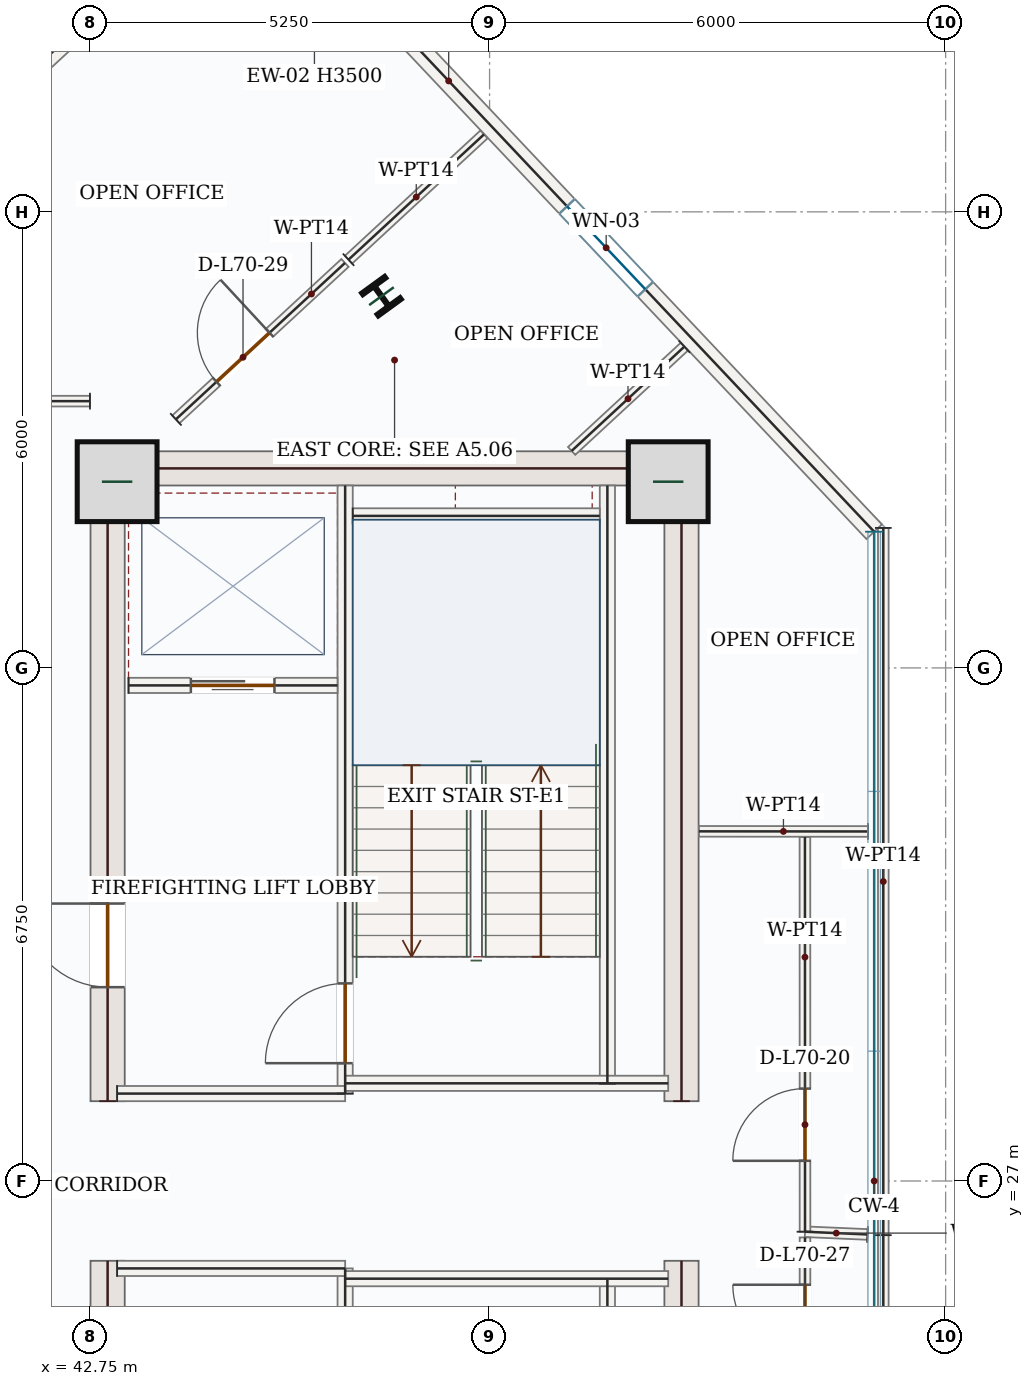
"""IFC4 building model, lengths in metres.
Left out: names, types, materials, properties, quantities, classifications, styles, units other than length and angle.
Written with IfcOpenShell. Run it as: python <this file> out.ifc"""

import sys

from ifc_helpers import new_model, si_unit, direction, frame, frame_2d, origin, origin_2d, place, context, subcontext, project, spatial, rectangle, i_section, extrude, source, transform, mapped, element, fill, save


model = new_model("IFC4")
c1 = context("Model", 3, precision=1e-05, world=origin(), true_north=direction((0.0, 1.0)))
c2 = subcontext(c1, "Body", "Model", "MODEL_VIEW")
j1 = project(units=[si_unit("LENGTHUNIT", "METRE"), si_unit("PLANEANGLEUNIT", "RADIAN")], contexts=[c1])
p1 = place(None, origin())
s1 = spatial("IfcSite", under=j1, at=p1, CompositionType="ELEMENT")
p2 = place(p1, origin())
s2 = spatial("IfcBuilding", under=s1, at=p2, CompositionType="ELEMENT")
p3 = place(p2, frame((0.0, 0.0, 291.6)))
s3 = spatial("IfcBuildingStorey", under=s2, at=p3, CompositionType="ELEMENT", Elevation=291.6)
p4 = place(p3, frame((42.975, 17.4, 0.0), z_axis=(0.0, 0.0, 1.0), x_axis=(0.0, 1.0, 0.0)))
e1 = element("IfcWall", 1, at=p4, inside=s3, PredefinedType="SHEAR", context=c2, shape_type="SweptSolid", body=[
    extrude(rectangle(XDim=8.55, YDim=0.45, at=frame_2d((4.275, 0.0))), origin(), (0.0, 0.0, 1.0), 3.5),
])
p5 = place(p4, frame((6.65, 0.0, 0.0)))
e2 = element("IfcOpeningElement", 2, at=p5, cuts=e1, PredefinedType="OPENING", context=c2, shape_type="SweptSolid", body=[
    extrude(rectangle(XDim=1.1, YDim=2.2, at=frame_2d((0.55, 1.1))), frame((0.0, 0.235, 0.0), z_axis=(0.0, -1.0, 0.0), x_axis=(1.0, 0.0, 0.0)), (0.0, 0.0, 1.0), 0.47),
])
p6 = place(p4, frame((1.75, 0.0, 0.0)))
e3 = element("IfcOpeningElement", 3, at=p6, cuts=e1, PredefinedType="OPENING", context=c2, shape_type="SweptSolid", body=[
    extrude(rectangle(XDim=1.3, YDim=2.2, at=frame_2d((0.65, 1.1))), frame((0.0, 0.235, 0.0), z_axis=(0.0, -1.0, 0.0), x_axis=(1.0, 0.0, 0.0)), (0.0, 0.0, 1.0), 0.47),
])
p7 = place(p4, frame((4.55, 0.0, 0.0)))
e4 = element("IfcOpeningElement", 4, at=p7, cuts=e1, PredefinedType="OPENING", context=c2, shape_type="SweptSolid", body=[
    extrude(rectangle(XDim=0.88, YDim=2.1, at=frame_2d((0.44, 1.05))), frame((0.0, 0.235, 0.0), z_axis=(0.0, -1.0, 0.0), x_axis=(1.0, 0.0, 0.0)), (0.0, 0.0, 1.0), 0.47),
])
p8 = place(p3, frame((42.975, 28.05, 0.0), z_axis=(0.0, 0.0, 1.0), x_axis=(0.0, 1.0, 0.0)))
e5 = element("IfcWall", 5, at=p8, inside=s3, PredefinedType="SHEAR", context=c2, shape_type="SweptSolid", body=[
    extrude(rectangle(XDim=8.55, YDim=0.45, at=frame_2d((4.275, 0.0))), origin(), (0.0, 0.0, 1.0), 3.5),
])
p9 = place(p8, frame((1.5, 0.0, 0.0)))
e6 = element("IfcOpeningElement", 6, at=p9, cuts=e5, PredefinedType="OPENING", context=c2, shape_type="SweptSolid", body=[
    extrude(rectangle(XDim=1.1, YDim=2.2, at=frame_2d((0.55, 1.1))), frame((0.0, 0.235, 0.0), z_axis=(0.0, -1.0, 0.0), x_axis=(1.0, 0.0, 0.0)), (0.0, 0.0, 1.0), 0.47),
])
m1 = source(origin(), c2, "Body", "SweptSolid", [
    extrude(rectangle(XDim=8.55, YDim=0.45, at=frame_2d((4.275, 0.0))), origin(), (0.0, 0.0, 1.0), 3.5),
])
for number, where, z_axis, x_axis in (
    (7, (50.525, 17.4, 0.0), (0.0, 0.0, 1.0), (0.0, 1.0, 0.0)),
    (8, (50.525, 28.05, 0.0), (0.0, 0.0, 1.0), (0.0, 1.0, 0.0)),
):
    element("IfcWall", number, at=place(p3, frame(where, z_axis=z_axis, x_axis=x_axis)), inside=s3, PredefinedType="SHEAR", context=c2, shape_type="MappedRepresentation", body=[
        mapped(m1, transform((0.0, 0.0, 0.0), x_axis=(1.0, 0.0, 0.0), y_axis=(0.0, 1.0, 0.0), z_axis=(0.0, 0.0, 1.0), scale=1.0)),
    ])
m2 = source(origin(), c2, "Body", "SweptSolid", [
    extrude(rectangle(XDim=7.1, YDim=0.45, at=frame_2d((3.55, 0.0))), origin(), (0.0, 0.0, 1.0), 3.5),
])
p10 = place(p3, frame((43.2, 36.375, 0.0), z_axis=(0.0, 0.0, 1.0), x_axis=(1.0, 0.0, 0.0)))
e9 = element("IfcWall", 9, at=p10, inside=s3, PredefinedType="SHEAR", context=c2, shape_type="MappedRepresentation", body=[
    mapped(m2, transform((0.0, 0.0, 0.0), x_axis=(1.0, 0.0, 0.0), y_axis=(0.0, 1.0, 0.0), z_axis=(0.0, 0.0, 1.0), scale=1.0)),
])
m3 = source(origin(), c2, "Body", "SweptSolid", [
    extrude(rectangle(XDim=1.05, YDim=1.05, at=origin_2d()), origin(), (0.0, 0.0, 1.0), 3.75),
])
for number, where, z_axis, x_axis in (
    (10, (43.1, 36.2, 0.0), (0.0, 0.0, 1.0), (1.0, 0.0, 0.0)),
    (11, (50.35, 36.2, 0.0), (0.0, 0.0, 1.0), (1.0, 0.0, 0.0)),
):
    element("IfcColumn", number, at=place(p3, frame(where, z_axis=z_axis, x_axis=x_axis)), inside=s3, PredefinedType="COLUMN", context=c2, shape_type="MappedRepresentation", body=[
        mapped(m3, transform((0.0, 0.0, 0.0), x_axis=(1.0, 0.0, 0.0), y_axis=(0.0, 1.0, 0.0), z_axis=(0.0, 0.0, 1.0), scale=1.0)),
    ])
m4 = source(origin(), c2, "Body", "SweptSolid", [
    extrude(i_section(OverallWidth=0.374, OverallDepth=0.372, WebThickness=0.016, FlangeThickness=0.026, FilletRadius=0.018, at=origin_2d()), origin(), (0.0, 0.0, 1.0), 3.75),
])
p11 = place(p3, frame((46.578, 38.641, 0.0), z_axis=(0.0, 0.0, 1.0), x_axis=(0.809016994375, 0.587785252292, 0.0)))
e12 = element("IfcColumn", 12, at=p11, inside=s3, PredefinedType="COLUMN", context=c2, shape_type="MappedRepresentation", body=[
    mapped(m4, transform((0.0, 0.0, 0.0), x_axis=(1.0, 0.0, 0.0), y_axis=(0.0, 1.0, 0.0), z_axis=(0.0, 0.0, 1.0), scale=1.0)),
])
p12 = place(p3, frame((39.447, 39.26, 0.0), z_axis=(0.0, 0.0, 1.0), x_axis=(0.734109106874, 0.679031530346, 0.0)))
e13 = element("IfcWall", 13, at=p12, inside=s3, PredefinedType="SOLIDWALL", context=c2, shape_type="SweptSolid", body=[
    extrude(rectangle(XDim=5.665, YDim=0.28, at=frame_2d((2.833, 0.0))), origin(), (0.0, 0.0, 1.0), 3.5),
])
p13 = place(p12, frame((2.082, 0.0, 0.85)))
e14 = element("IfcOpeningElement", 14, at=p13, cuts=e13, PredefinedType="OPENING", context=c2, shape_type="SweptSolid", body=[
    extrude(rectangle(XDim=1.5, YDim=1.5, at=frame_2d((0.75, 0.75))), frame((0.0, 0.15, 0.0), z_axis=(0.0, -1.0, 0.0), x_axis=(1.0, 0.0, 0.0)), (0.0, 0.0, 1.0), 0.3),
])
p14 = place(p3, frame((46.008, 43.013, 0.0), z_axis=(0.0, 0.0, 1.0), x_axis=(0.68643580465, -0.727190405667, 0.0)))
e15 = element("IfcWall", 15, at=p14, inside=s3, PredefinedType="SOLIDWALL", context=c2, shape_type="SweptSolid", body=[
    extrude(rectangle(XDim=10.274, YDim=0.28, at=frame_2d((5.137, 0.0))), origin(), (0.0, 0.0, 1.0), 3.5),
])
p15 = place(p14, frame((4.387, 0.0, 0.85)))
e16 = element("IfcOpeningElement", 16, at=p15, cuts=e15, PredefinedType="OPENING", context=c2, shape_type="SweptSolid", body=[
    extrude(rectangle(XDim=1.5, YDim=1.5, at=frame_2d((0.75, 0.75))), frame((0.0, 0.15, 0.0), z_axis=(0.0, -1.0, 0.0), x_axis=(1.0, 0.0, 0.0)), (0.0, 0.0, 1.0), 0.3),
])
m5 = source(origin(), c2, "Body", "SweptSolid", [
    extrude(rectangle(XDim=7.87, YDim=0.2, at=frame_2d((3.935, 0.0))), origin(), (0.0, 0.0, 1.0), 3.5),
])
for number, where, z_axis, x_axis in (
    (17, (49.55, 17.85, 0.0), (0.0, 0.0, 1.0), (0.0, 1.0, 0.0)),
    (18, (49.55, 28.28, 0.0), (0.0, 0.0, 1.0), (0.0, 1.0, 0.0)),
):
    element("IfcWall", number, at=place(p3, frame(where, z_axis=z_axis, x_axis=x_axis)), inside=s3, PredefinedType="SOLIDWALL", context=c2, shape_type="MappedRepresentation", body=[
        mapped(m5, transform((0.0, 0.0, 0.0), x_axis=(1.0, 0.0, 0.0), y_axis=(0.0, 1.0, 0.0), z_axis=(0.0, 0.0, 1.0), scale=1.0)),
    ])
p16 = place(p3, frame((46.1, 17.85, 0.0), z_axis=(0.0, 0.0, 1.0), x_axis=(0.0, 1.0, 0.0)))
e19 = element("IfcWall", 19, at=p16, inside=s3, PredefinedType="SOLIDWALL", context=c2, shape_type="SweptSolid", body=[
    extrude(rectangle(XDim=8.0, YDim=0.2, at=frame_2d((4.0, 0.0))), origin(), (0.0, 0.0, 1.0), 3.5),
])
p17 = place(p16, frame((6.3, 0.0, 0.0)))
e20 = element("IfcOpeningElement", 20, at=p17, cuts=e19, PredefinedType="OPENING", context=c2, shape_type="SweptSolid", body=[
    extrude(rectangle(XDim=1.05, YDim=2.15, at=frame_2d((0.525, 1.075))), frame((0.0, 0.11, 0.0), z_axis=(0.0, -1.0, 0.0), x_axis=(1.0, 0.0, 0.0)), (0.0, 0.0, 1.0), 0.22),
])
p18 = place(p3, frame((46.1, 28.15, 0.0), z_axis=(0.0, 0.0, 1.0), x_axis=(0.0, 1.0, 0.0)))
e21 = element("IfcWall", 21, at=p18, inside=s3, PredefinedType="SOLIDWALL", context=c2, shape_type="SweptSolid", body=[
    extrude(rectangle(XDim=8.0, YDim=0.2, at=frame_2d((4.0, 0.0))), origin(), (0.0, 0.0, 1.0), 3.5),
])
p19 = place(p18, frame((0.4, 0.0, 0.0)))
e22 = element("IfcOpeningElement", 22, at=p19, cuts=e21, PredefinedType="OPENING", context=c2, shape_type="SweptSolid", body=[
    extrude(rectangle(XDim=1.05, YDim=2.15, at=frame_2d((0.525, 1.075))), frame((0.0, 0.11, 0.0), z_axis=(0.0, -1.0, 0.0), x_axis=(1.0, 0.0, 0.0)), (0.0, 0.0, 1.0), 0.22),
])
m6 = source(origin(), c2, "Body", "SweptSolid", [
    extrude(rectangle(XDim=3.0, YDim=0.2, at=frame_2d((1.5, 0.0))), origin(), (0.0, 0.0, 1.0), 3.5),
])
p20 = place(p3, frame((43.1, 25.85, 0.0), z_axis=(0.0, 0.0, 1.0), x_axis=(1.0, 0.0, 0.0)))
e23 = element("IfcWall", 23, at=p20, inside=s3, PredefinedType="SOLIDWALL", context=c2, shape_type="MappedRepresentation", body=[
    mapped(m6, transform((0.0, 0.0, 0.0), x_axis=(1.0, 0.0, 0.0), y_axis=(0.0, 1.0, 0.0), z_axis=(0.0, 0.0, 1.0), scale=1.0)),
])
m7 = source(origin(), c2, "Body", "SweptSolid", [
    extrude(rectangle(XDim=4.25, YDim=0.2, at=frame_2d((2.125, 0.0))), origin(), (0.0, 0.0, 1.0), 3.5),
])
p21 = place(p3, frame((46.1, 25.715, 0.0), z_axis=(0.0, 0.0, 1.0), x_axis=(1.0, 0.0, 0.0)))
e24 = element("IfcWall", 24, at=p21, inside=s3, PredefinedType="SOLIDWALL", context=c2, shape_type="MappedRepresentation", body=[
    mapped(m7, transform((0.0, 0.0, 0.0), x_axis=(1.0, 0.0, 0.0), y_axis=(0.0, 1.0, 0.0), z_axis=(0.0, 0.0, 1.0), scale=1.0)),
])
p22 = place(p3, frame((43.1, 28.15, 0.0), z_axis=(0.0, 0.0, 1.0), x_axis=(1.0, 0.0, 0.0)))
e25 = element("IfcWall", 25, at=p22, inside=s3, PredefinedType="SOLIDWALL", context=c2, shape_type="MappedRepresentation", body=[
    mapped(m6, transform((0.0, 0.0, 0.0), x_axis=(1.0, 0.0, 0.0), y_axis=(0.0, 1.0, 0.0), z_axis=(0.0, 0.0, 1.0), scale=1.0)),
])
p23 = place(p3, frame((46.1, 28.285, 0.0), z_axis=(0.0, 0.0, 1.0), x_axis=(1.0, 0.0, 0.0)))
e26 = element("IfcWall", 26, at=p23, inside=s3, PredefinedType="SOLIDWALL", context=c2, shape_type="MappedRepresentation", body=[
    mapped(m7, transform((0.0, 0.0, 0.0), x_axis=(1.0, 0.0, 0.0), y_axis=(0.0, 1.0, 0.0), z_axis=(0.0, 0.0, 1.0), scale=1.0)),
])
m8 = source(origin(), c2, "Body", "SweptSolid", [
    extrude(rectangle(XDim=3.25, YDim=0.2, at=frame_2d((1.625, 0.0))), origin(), (0.0, 0.0, 1.0), 3.5),
])
p24 = place(p3, frame((46.2, 35.75, 0.0), z_axis=(0.0, 0.0, 1.0), x_axis=(1.0, 0.0, 0.0)))
e27 = element("IfcWall", 27, at=p24, inside=s3, PredefinedType="SOLIDWALL", context=c2, shape_type="MappedRepresentation", body=[
    mapped(m8, transform((0.0, 0.0, 0.0), x_axis=(1.0, 0.0, 0.0), y_axis=(0.0, 1.0, 0.0), z_axis=(0.0, 0.0, 1.0), scale=1.0)),
])
p25 = place(p3, frame((43.25, 33.52, 0.0), z_axis=(0.0, 0.0, 1.0), x_axis=(1.0, 0.0, 0.0)))
e28 = element("IfcWall", 28, at=p25, inside=s3, PredefinedType="SOLIDWALL", context=c2, shape_type="SweptSolid", body=[
    extrude(rectangle(XDim=2.75, YDim=0.2, at=frame_2d((1.375, 0.0))), origin(), (0.0, 0.0, 1.0), 3.5),
])
p26 = place(p25, frame((0.82, 0.0, 0.0)))
e29 = element("IfcOpeningElement", 29, at=p26, cuts=e28, PredefinedType="OPENING", context=c2, shape_type="SweptSolid", body=[
    extrude(rectangle(XDim=1.1, YDim=2.15, at=frame_2d((0.55, 1.075))), frame((0.0, 0.11, 0.0), z_axis=(0.0, -1.0, 0.0), x_axis=(1.0, 0.0, 0.0)), (0.0, 0.0, 1.0), 0.22),
])
p27 = place(p3, frame((43.873, 37.02, 0.0), z_axis=(0.0, 0.0, 1.0), x_axis=(0.734120521476, 0.679019189676, 0.0)))
e30 = element("IfcWall", 30, at=p27, inside=s3, PredefinedType="PARTITIONING", context=c2, shape_type="SweptSolid", body=[
    extrude(rectangle(XDim=3.031, YDim=0.14, at=frame_2d((1.515, 0.0))), origin(), (0.0, 0.0, 1.0), 3.5),
])
p28 = place(p27, frame((0.728, 0.0, 0.0)))
e31 = element("IfcOpeningElement", 31, at=p28, cuts=e30, PredefinedType="OPENING", context=c2, shape_type="SweptSolid", body=[
    extrude(rectangle(XDim=0.95, YDim=2.15, at=frame_2d((0.475, 1.075))), frame((0.0, 0.08, 0.0), z_axis=(0.0, -1.0, 0.0), x_axis=(1.0, 0.0, 0.0)), (0.0, 0.0, 1.0), 0.16),
])
m9 = source(origin(), c2, "Body", "SweptSolid", [
    extrude(rectangle(XDim=2.428, YDim=0.14, at=frame_2d((1.214, 0.0))), origin(), (0.0, 0.0, 1.0), 3.5),
])
p29 = place(p3, frame((46.144, 39.121, 0.0), z_axis=(0.0, 0.0, 1.0), x_axis=(0.734124504125, 0.679014883815, 0.0)))
e32 = element("IfcWall", 32, at=p29, inside=s3, PredefinedType="PARTITIONING", context=c2, shape_type="MappedRepresentation", body=[
    mapped(m9, transform((0.0, 0.0, 0.0), x_axis=(1.0, 0.0, 0.0), y_axis=(0.0, 1.0, 0.0), z_axis=(0.0, 0.0, 1.0), scale=1.0)),
])
m10 = source(origin(), c2, "Body", "SweptSolid", [
    extrude(rectangle(XDim=2.02, YDim=0.14, at=frame_2d((1.01, 0.0))), origin(), (0.0, 0.0, 1.0), 3.5),
])
p30 = place(p3, frame((50.562, 37.977, 0.0), z_axis=(0.0, 0.0, 1.0), x_axis=(-0.734126550915, -0.679012670899, 0.0)))
e33 = element("IfcWall", 33, at=p30, inside=s3, PredefinedType="PARTITIONING", context=c2, shape_type="MappedRepresentation", body=[
    mapped(m10, transform((0.0, 0.0, 0.0), x_axis=(1.0, 0.0, 0.0), y_axis=(0.0, 1.0, 0.0), z_axis=(0.0, 0.0, 1.0), scale=1.0)),
])
m11 = source(origin(), c2, "Body", "SweptSolid", [
    extrude(rectangle(XDim=2.223, YDim=0.14, at=frame_2d((1.111, 0.0))), origin(), (0.0, 0.0, 1.0), 3.5),
])
p31 = place(p3, frame((52.978, 31.598, 0.0), z_axis=(0.0, 0.0, 1.0), x_axis=(-0.999999704402, 0.000768892567, 0.0)))
e34 = element("IfcWall", 34, at=p31, inside=s3, PredefinedType="PARTITIONING", context=c2, shape_type="MappedRepresentation", body=[
    mapped(m11, transform((0.0, 0.0, 0.0), x_axis=(1.0, 0.0, 0.0), y_axis=(0.0, 1.0, 0.0), z_axis=(0.0, 0.0, 1.0), scale=1.0)),
])
m12 = source(origin(), c2, "Body", "SweptSolid", [
    extrude(rectangle(XDim=9.304, YDim=0.14, at=frame_2d((4.652, 0.0))), origin(), (0.0, 0.0, 1.0), 3.5),
])
p32 = place(p3, frame((53.18, 35.592, 0.0), z_axis=(0.0, 0.0, 1.0), x_axis=(0.0, -1.0, 0.0)))
e35 = element("IfcWall", 35, at=p32, inside=s3, PredefinedType="PARTITIONING", context=c2, shape_type="MappedRepresentation", body=[
    mapped(m12, transform((0.0, 0.0, 0.0), x_axis=(1.0, 0.0, 0.0), y_axis=(0.0, 1.0, 0.0), z_axis=(0.0, 0.0, 1.0), scale=1.0)),
])
m13 = source(origin(), c2, "Body", "SweptSolid", [
    extrude(rectangle(XDim=0.823, YDim=0.14, at=frame_2d((0.412, 0.0))), origin(), (0.0, 0.0, 1.0), 3.5),
])
p33 = place(p3, frame((52.972, 26.297, 0.0), z_axis=(0.0, 0.0, 1.0), x_axis=(-0.999049432265, 0.043591649315, 0.0)))
e36 = element("IfcWall", 36, at=p33, inside=s3, PredefinedType="PARTITIONING", context=c2, shape_type="MappedRepresentation", body=[
    mapped(m13, transform((0.0, 0.0, 0.0), x_axis=(1.0, 0.0, 0.0), y_axis=(0.0, 1.0, 0.0), z_axis=(0.0, 0.0, 1.0), scale=1.0)),
])
p34 = place(p3, frame((52.15, 26.333, 0.0), z_axis=(0.0, 0.0, 1.0), x_axis=(-0.000188111359, 0.999999982307, 0.0)))
e37 = element("IfcWall", 37, at=p34, inside=s3, PredefinedType="PARTITIONING", context=c2, shape_type="SweptSolid", body=[
    extrude(rectangle(XDim=5.191, YDim=0.14, at=frame_2d((2.596, 0.0))), origin(), (0.0, 0.0, 1.0), 3.5),
])
p35 = place(p34, frame((0.933, 0.0, 0.0)))
e38 = element("IfcOpeningElement", 38, at=p35, cuts=e37, PredefinedType="OPENING", context=c2, shape_type="SweptSolid", body=[
    extrude(rectangle(XDim=0.95, YDim=2.15, at=frame_2d((0.475, 1.075))), frame((0.0, 0.08, 0.0), z_axis=(0.0, -1.0, 0.0), x_axis=(1.0, 0.0, 0.0)), (0.0, 0.0, 1.0), 0.16),
])
p36 = place(p3, frame((52.149, 22.477, 0.0), z_axis=(0.0, 0.0, 1.0), x_axis=(0.000322913959, 0.999999947863, 0.0)))
e39 = element("IfcWall", 39, at=p36, inside=s3, PredefinedType="PARTITIONING", context=c2, shape_type="SweptSolid", body=[
    extrude(rectangle(XDim=3.78, YDim=0.14, at=frame_2d((1.89, 0.0))), origin(), (0.0, 0.0, 1.0), 3.5),
])
p37 = place(p36, frame((2.208, 0.0, 0.0)))
e40 = element("IfcOpeningElement", 40, at=p37, cuts=e39, PredefinedType="OPENING", context=c2, shape_type="SweptSolid", body=[
    extrude(rectangle(XDim=0.95, YDim=2.15, at=frame_2d((0.475, 1.075))), frame((0.0, 0.08, 0.0), z_axis=(0.0, -1.0, 0.0), x_axis=(1.0, 0.0, 0.0)), (0.0, 0.0, 1.0), 0.16),
])
m14 = source(origin(), c2, "Body", "SweptSolid", [
    extrude(rectangle(XDim=7.879, YDim=0.14, at=frame_2d((3.94, 0.0))), origin(), (0.0, 0.0, 1.0), 3.5),
])
p38 = place(p3, frame((53.18, 26.288, 0.0), z_axis=(0.0, 0.0, 1.0), x_axis=(0.0, -1.0, 0.0)))
e41 = element("IfcWall", 41, at=p38, inside=s3, PredefinedType="PARTITIONING", context=c2, shape_type="MappedRepresentation", body=[
    mapped(m14, transform((0.0, 0.0, 0.0), x_axis=(1.0, 0.0, 0.0), y_axis=(0.0, 1.0, 0.0), z_axis=(0.0, 0.0, 1.0), scale=1.0)),
])
p39 = place(p3, frame((42.742, 37.26, 0.0), z_axis=(0.0, 0.0, 1.0), x_axis=(-0.999999999261, 3.8433452e-05, 0.0)))
e42 = element("IfcWall", 42, at=p39, inside=s3, PredefinedType="PARTITIONING", context=c2, shape_type="SweptSolid", body=[
    extrude(rectangle(XDim=6.352, YDim=0.14, at=frame_2d((3.176, 0.0))), origin(), (0.0, 0.0, 1.0), 3.5),
])
p40 = place(p39, frame((4.214, 0.0, 0.0)))
e43 = element("IfcOpeningElement", 43, at=p40, cuts=e42, PredefinedType="OPENING", context=c2, shape_type="SweptSolid", body=[
    extrude(rectangle(XDim=0.95, YDim=2.15, at=frame_2d((0.475, 1.075))), frame((0.0, 0.08, 0.0), z_axis=(0.0, -1.0, 0.0), x_axis=(1.0, 0.0, 0.0)), (0.0, 0.0, 1.0), 0.16),
])
m15 = source(origin(), c2, "Body", "SweptSolid", [
    extrude(rectangle(XDim=1.5, YDim=1.5, at=frame_2d((0.75, 0.75))), frame((0.0, 0.03, 0.0), z_axis=(0.0, -1.0, 0.0), x_axis=(1.0, 0.0, 0.0)), (0.0, 0.0, 1.0), 0.06),
])
p41 = place(p15, origin())
e44 = element("IfcWindow", 44, at=p41, inside=s3, PartitioningType="SINGLE_PANEL", PredefinedType="WINDOW", context=c2, shape_type="MappedRepresentation", body=[
    mapped(m15, transform((0.0, 0.0, 0.0), x_axis=(1.0, 0.0, 0.0), y_axis=(0.0, 1.0, 0.0), z_axis=(0.0, 0.0, 1.0), scale=1.0)),
])
fill(e16, e44)
m16 = source(origin(), c2, "Body", "SweptSolid", [
    extrude(rectangle(XDim=1.05, YDim=2.15, at=frame_2d((0.525, 1.075))), frame((0.0, 0.025, 0.0), z_axis=(0.0, -1.0, 0.0), x_axis=(1.0, 0.0, 0.0)), (0.0, 0.0, 1.0), 0.05),
])
p42 = place(p19, origin())
e45 = element("IfcDoor", 45, at=p42, inside=s3, OperationType="SINGLE_SWING_LEFT", PredefinedType="DOOR", context=c2, shape_type="MappedRepresentation", body=[
    mapped(m16, transform((0.0, 0.0, 0.0), x_axis=(1.0, 0.0, 0.0), y_axis=(0.0, 1.0, 0.0), z_axis=(0.0, 0.0, 1.0), scale=1.0)),
])
fill(e22, e45)
m17 = source(origin(), c2, "Body", "SweptSolid", [
    extrude(rectangle(XDim=1.1, YDim=2.15, at=frame_2d((0.55, 1.075))), frame((0.0, 0.025, 0.0), z_axis=(0.0, -1.0, 0.0), x_axis=(1.0, 0.0, 0.0)), (0.0, 0.0, 1.0), 0.05),
])
p43 = place(p26, origin())
e46 = element("IfcDoor", 46, at=p43, inside=s3, OperationType="DOUBLE_DOOR_SLIDING", PredefinedType="DOOR", context=c2, shape_type="MappedRepresentation", body=[
    mapped(m17, transform((0.0, 0.0, 0.0), x_axis=(1.0, 0.0, 0.0), y_axis=(0.0, 1.0, 0.0), z_axis=(0.0, 0.0, 1.0), scale=1.0)),
])
fill(e29, e46)
m18 = source(origin(), c2, "Body", "SweptSolid", [
    extrude(rectangle(XDim=1.1, YDim=2.2, at=frame_2d((0.55, 1.1))), frame((0.0, 0.025, 0.0), z_axis=(0.0, -1.0, 0.0), x_axis=(1.0, 0.0, 0.0)), (0.0, 0.0, 1.0), 0.05),
])
p44 = place(p9, origin())
e47 = element("IfcDoor", 47, at=p44, inside=s3, OperationType="SINGLE_SWING_RIGHT", PredefinedType="DOOR", context=c2, shape_type="MappedRepresentation", body=[
    mapped(m18, transform((0.0, 0.0, 0.0), x_axis=(1.0, 0.0, 0.0), y_axis=(0.0, 1.0, 0.0), z_axis=(0.0, 0.0, 1.0), scale=1.0)),
])
fill(e6, e47)
m19 = source(origin(), c2, "Body", "SweptSolid", [
    extrude(rectangle(XDim=0.95, YDim=2.15, at=frame_2d((0.475, 1.075))), frame((0.0, 0.025, 0.0), z_axis=(0.0, -1.0, 0.0), x_axis=(1.0, 0.0, 0.0)), (0.0, 0.0, 1.0), 0.05),
])
p45 = place(p35, origin())
e48 = element("IfcDoor", 48, at=p45, inside=s3, OperationType="SINGLE_SWING_LEFT", PredefinedType="DOOR", context=c2, shape_type="MappedRepresentation", body=[
    mapped(m19, transform((0.0, 0.0, 0.0), x_axis=(1.0, 0.0, 0.0), y_axis=(0.0, 1.0, 0.0), z_axis=(0.0, 0.0, 1.0), scale=1.0)),
])
fill(e38, e48)
p46 = place(p37, origin())
e49 = element("IfcDoor", 49, at=p46, inside=s3, OperationType="SINGLE_SWING_RIGHT", PredefinedType="DOOR", context=c2, shape_type="MappedRepresentation", body=[
    mapped(m19, transform((0.0, 0.0, 0.0), x_axis=(1.0, 0.0, 0.0), y_axis=(0.0, 1.0, 0.0), z_axis=(0.0, 0.0, 1.0), scale=1.0)),
])
fill(e40, e49)
p47 = place(p28, origin())
e50 = element("IfcDoor", 50, at=p47, inside=s3, OperationType="SINGLE_SWING_RIGHT", PredefinedType="DOOR", context=c2, shape_type="MappedRepresentation", body=[
    mapped(m19, transform((0.0, 0.0, 0.0), x_axis=(1.0, 0.0, 0.0), y_axis=(0.0, 1.0, 0.0), z_axis=(0.0, 0.0, 1.0), scale=1.0)),
])
fill(e31, e50)
save(model, sys.argv[1])
